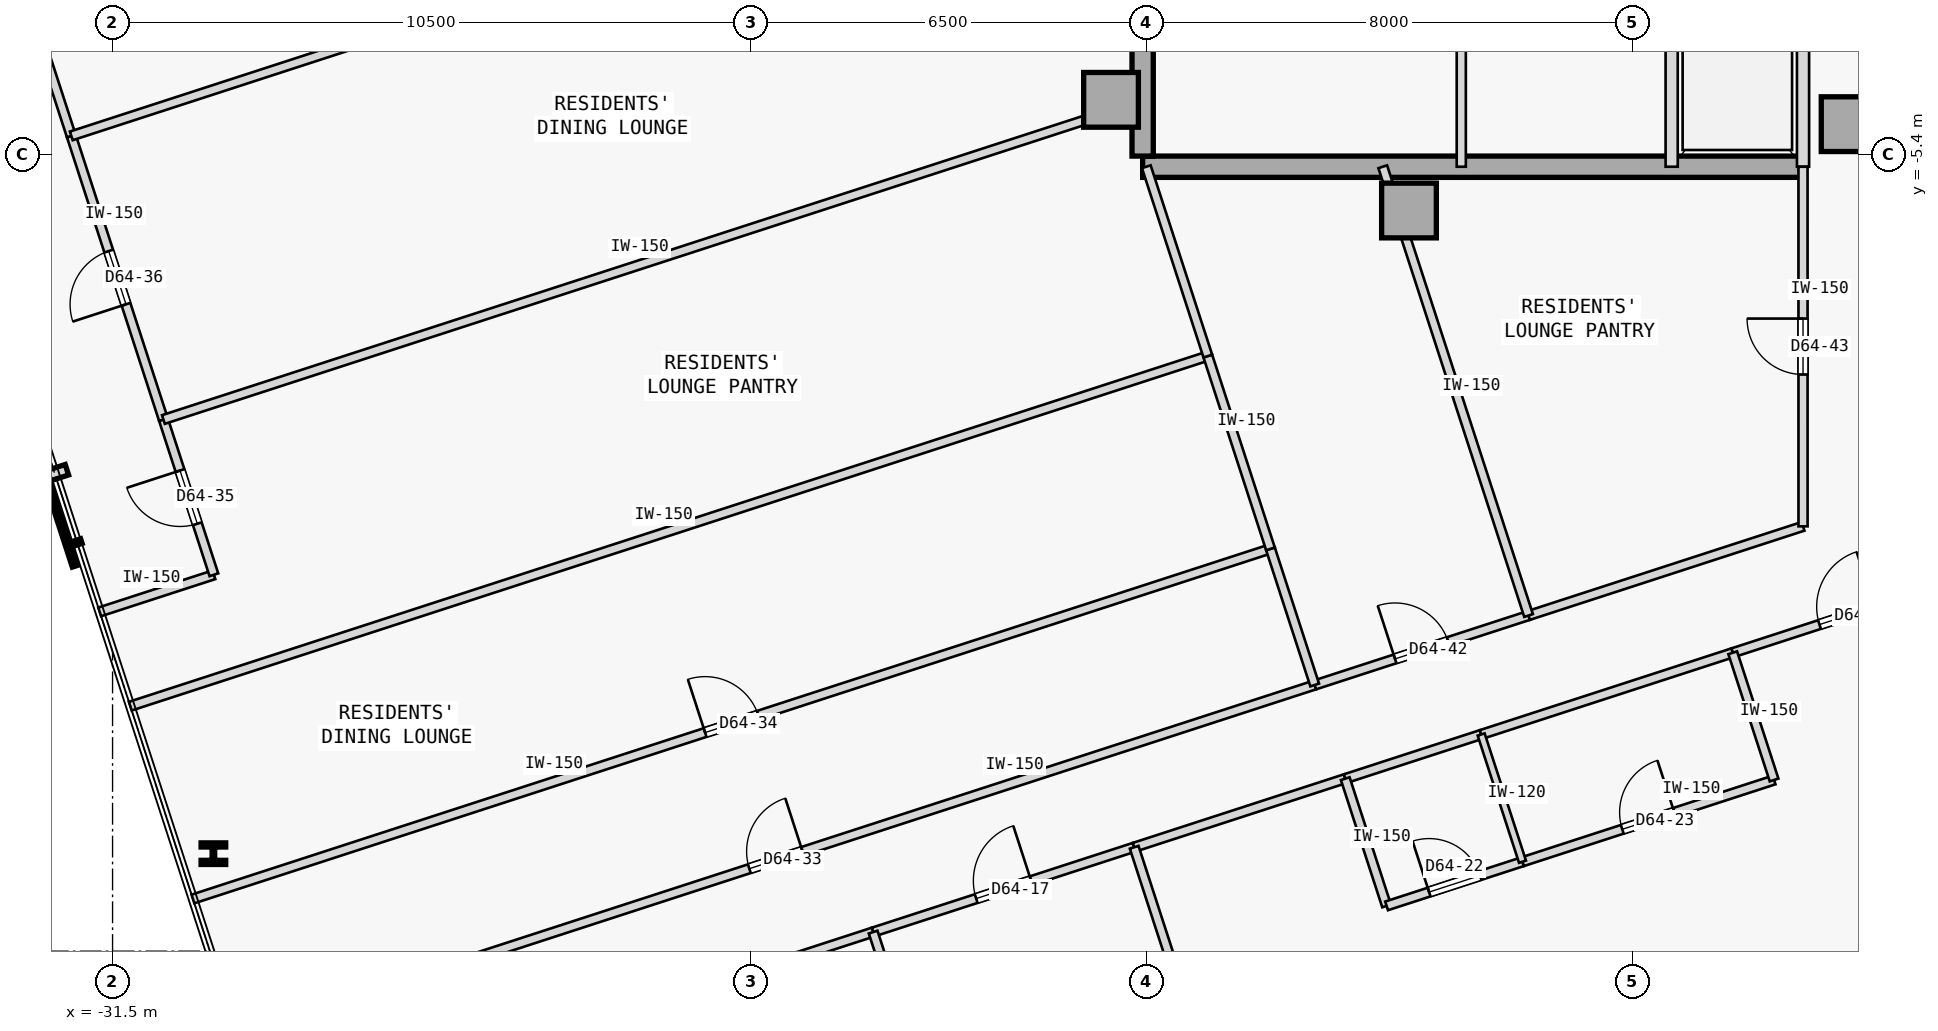
"""IFC4 building model, lengths in metres.
Left out: names, types, materials, properties, quantities, classifications, styles, units other than length and angle.
Written with IfcOpenShell. Run it as: python <this file> out.ifc"""

import sys

from ifc_helpers import new_model, si_unit, direction, frame, frame_2d, origin, origin_2d, place, context, subcontext, project, spatial, rectangle, i_section, extrude, element, fill, save


model = new_model("IFC4")
c1 = context("Model", 3, precision=1e-05, world=origin(), true_north=direction((0.0, 1.0)))
c2 = subcontext(c1, "Body", "Model", "MODEL_VIEW")
j1 = project(units=[si_unit("LENGTHUNIT", "METRE"), si_unit("PLANEANGLEUNIT", "RADIAN")], contexts=[c1])
p1 = place(None, origin())
s1 = spatial("IfcSite", under=j1, at=p1, CompositionType="ELEMENT")
p2 = place(p1, origin())
s2 = spatial("IfcBuilding", under=s1, at=p2, CompositionType="ELEMENT")
p3 = place(p2, frame((0.0, 0.0, 241.05)))
s3 = spatial("IfcBuildingStorey", under=s2, at=p3, CompositionType="ELEMENT", Elevation=241.05)
for number, where, z_axis, x_axis in (
    (1, (-15.08, -4.5, 0.0), (0.0, 0.0, 1.0), (1.0, 0.0, 0.0)),
    (2, (-10.18, -6.32, 0.0), (0.0, 0.0, 1.0), (1.0, 0.0, 0.0)),
    (3, (-2.95, -4.9, 0.0), (0.0, 0.0, 1.0), (1.0, 0.0, 0.0)),
):
    element("IfcColumn", number, at=place(p3, frame(where, z_axis=z_axis, x_axis=x_axis)), inside=s3, PredefinedType="COLUMN", context=c2, shape_type="SweptSolid", body=[
        extrude(rectangle(XDim=0.9, YDim=0.9, at=origin_2d()), origin(), (0.0, 0.0, 1.0), 3.35),
    ])
p4 = place(p3, frame((-14.56, -5.6, 0.0), z_axis=(0.0, 0.0, 1.0), x_axis=(1.0, 0.0, 0.0)))
e4 = element("IfcWall", 4, at=p4, inside=s3, PredefinedType="SHEAR", context=c2, shape_type="SweptSolid", body=[
    extrude(rectangle(XDim=10.86, YDim=0.35, at=frame_2d((5.43, 0.0))), origin(), (0.0, 0.0, 1.0), 3.125),
])
p5 = place(p3, frame((-14.56, -5.425, 0.0), z_axis=(0.0, 0.0, 1.0), x_axis=(0.0, 1.0, 0.0)))
e5 = element("IfcWall", 5, at=p5, inside=s3, PredefinedType="SHEAR", context=c2, shape_type="SweptSolid", body=[
    extrude(rectangle(XDim=10.85, YDim=0.35, at=frame_2d((5.425, 0.0))), origin(), (0.0, 0.0, 1.0), 3.125),
])
p6 = place(p3, frame((-29.842, -16.897, 0.0), z_axis=(0.0, 0.0, 1.0), x_axis=(1.0, 0.0, 0.0)))
e6 = element("IfcColumn", 6, at=p6, inside=s3, PredefinedType="COLUMN", context=c2, shape_type="SweptSolid", body=[
    extrude(i_section(OverallWidth=0.405, OverallDepth=0.355, WebThickness=0.042, FlangeThickness=0.068, FilletRadius=0.015, at=origin_2d()), origin(), (0.0, 0.0, 1.0), 3.35),
])
for number, where, z_axis, x_axis in (
    (7, (-3.7, -5.6, 0.0), (0.0, 0.0, 1.0), (0.0, 1.0, 0.0)),
    (8, (-5.86, -5.6, 0.0), (0.0, 0.0, 1.0), (0.0, 1.0, 0.0)),
):
    element("IfcWall", number, at=place(p3, frame(where, z_axis=z_axis, x_axis=x_axis)), inside=s3, PredefinedType="STANDARD", context=c2, shape_type="SweptSolid", body=[
        extrude(rectangle(XDim=2.65, YDim=0.2, at=frame_2d((1.325, 0.0))), origin(), (0.0, 0.0, 1.0), 3.125),
    ])
p7 = place(p3, frame((-9.32, -5.6, 0.0), z_axis=(0.0, 0.0, 1.0), x_axis=(0.0, 1.0, 0.0)))
e9 = element("IfcWall", 9, at=p7, inside=s3, PredefinedType="PARTITIONING", context=c2, shape_type="SweptSolid", body=[
    extrude(rectangle(XDim=2.65, YDim=0.15, at=frame_2d((1.325, 0.0))), origin(), (0.0, 0.0, 1.0), 3.125),
])
p8 = place(p3, frame((-18.992, -18.186, 0.0), z_axis=(0.0, 0.0, 1.0), x_axis=(0.951067846467, 0.308982121516, 0.0)))
e10 = element("IfcWall", 10, at=p8, inside=s3, PredefinedType="PARTITIONING", context=c2, shape_type="SweptSolid", body=[
    extrude(rectangle(XDim=4.514, YDim=0.15, at=frame_2d((2.257, 0.0))), origin(), (0.0, 0.0, 1.0), 3.125),
])
p9 = place(p8, frame((1.782, 0.0, 0.0)))
e11 = element("IfcOpeningElement", 11, at=p9, cuts=e10, PredefinedType="OPENING", context=c2, shape_type="SweptSolid", body=[
    extrude(rectangle(XDim=0.95, YDim=2.15, at=frame_2d((0.475, 1.075))), frame((0.0, 0.085, 0.0), z_axis=(0.0, -1.0, 0.0), x_axis=(1.0, 0.0, 0.0)), (0.0, 0.0, 1.0), 0.17),
])
p10 = place(p3, frame((-23.129, -19.53, 0.0), z_axis=(0.0, 0.0, 1.0), x_axis=(0.951036130958, 0.309079726951, 0.0)))
e12 = element("IfcWall", 12, at=p10, inside=s3, PredefinedType="PARTITIONING", context=c2, shape_type="SweptSolid", body=[
    extrude(rectangle(XDim=4.35, YDim=0.15, at=frame_2d((2.175, 0.0))), origin(), (0.0, 0.0, 1.0), 3.125),
])
p11 = place(p3, frame((-14.699, -16.791, 0.0), z_axis=(0.0, 0.0, 1.0), x_axis=(0.951050780541, 0.309034646652, 0.0)))
e13 = element("IfcWall", 13, at=p11, inside=s3, PredefinedType="PARTITIONING", context=c2, shape_type="SweptSolid", body=[
    extrude(rectangle(XDim=3.65, YDim=0.15, at=frame_2d((1.825, 0.0))), origin(), (0.0, 0.0, 1.0), 3.125),
])
p12 = place(p3, frame((-4.856, -13.593, 0.0), z_axis=(0.0, 0.0, 1.0), x_axis=(0.951054051148, 0.309024581215, 0.0)))
e14 = element("IfcWall", 14, at=p12, inside=s3, PredefinedType="PARTITIONING", context=c2, shape_type="SweptSolid", body=[
    extrude(rectangle(XDim=3.95, YDim=0.15, at=frame_2d((1.975, 0.0))), origin(), (0.0, 0.0, 1.0), 3.125),
])
p13 = place(p12, frame((1.5, 0.0, 0.0)))
e15 = element("IfcOpeningElement", 15, at=p13, cuts=e14, PredefinedType="OPENING", context=c2, shape_type="SweptSolid", body=[
    extrude(rectangle(XDim=0.95, YDim=2.15, at=frame_2d((0.475, 1.075))), frame((0.0, 0.085, 0.0), z_axis=(0.0, -1.0, 0.0), x_axis=(1.0, 0.0, 0.0)), (0.0, 0.0, 1.0), 0.17),
])
p14 = place(p3, frame((-11.228, -15.663, 0.0), z_axis=(0.0, 0.0, 1.0), x_axis=(0.951076048914, 0.308956872689, 0.0)))
e16 = element("IfcWall", 16, at=p14, inside=s3, PredefinedType="PARTITIONING", context=c2, shape_type="SweptSolid", body=[
    extrude(rectangle(XDim=2.35, YDim=0.15, at=frame_2d((1.175, 0.0))), origin(), (0.0, 0.0, 1.0), 3.125),
])
p15 = place(p3, frame((-8.993, -14.937, 0.0), z_axis=(0.0, 0.0, 1.0), x_axis=(0.951052627573, 0.309028962374, 0.0)))
e17 = element("IfcWall", 17, at=p15, inside=s3, PredefinedType="PARTITIONING", context=c2, shape_type="SweptSolid", body=[
    extrude(rectangle(XDim=4.35, YDim=0.15, at=frame_2d((2.175, 0.0))), origin(), (0.0, 0.0, 1.0), 3.125),
])
p16 = place(p3, frame((-29.45, -19.881, 0.0), z_axis=(0.0, 0.0, 1.0), x_axis=(0.95105650271, 0.309017036186, 0.0)))
e18 = element("IfcWall", 18, at=p16, inside=s3, PredefinedType="PARTITIONING", context=c2, shape_type="SweptSolid", body=[
    extrude(rectangle(XDim=18.632, YDim=0.15, at=frame_2d((9.316, 0.0))), origin(), (0.0, 0.0, 1.0), 3.125),
])
p17 = place(p16, frame((8.856, 0.0, 0.0)))
e19 = element("IfcOpeningElement", 19, at=p17, cuts=e18, PredefinedType="OPENING", context=c2, shape_type="SweptSolid", body=[
    extrude(rectangle(XDim=0.92, YDim=2.15, at=frame_2d((0.46, 1.075))), frame((0.0, 0.085, 0.0), z_axis=(0.0, -1.0, 0.0), x_axis=(1.0, 0.0, 0.0)), (0.0, 0.0, 1.0), 0.17),
])
p18 = place(p3, frame((-31.712, -12.921, 0.0), z_axis=(0.0, 0.0, 1.0), x_axis=(0.951054051148, 0.309024581215, 0.0)))
e20 = element("IfcWall", 20, at=p18, inside=s3, PredefinedType="PARTITIONING", context=c2, shape_type="SweptSolid", body=[
    extrude(rectangle(XDim=1.975, YDim=0.15, at=frame_2d((0.988, 0.0))), origin(), (0.0, 0.0, 1.0), 3.125),
])
p19 = place(p3, frame((-29.833, -12.311, 0.0), z_axis=(0.0, 0.0, 1.0), x_axis=(-0.309044953986, 0.951047431213, 0.0)))
e21 = element("IfcWall", 21, at=p19, inside=s3, PredefinedType="PARTITIONING", context=c2, shape_type="SweptSolid", body=[
    extrude(rectangle(XDim=2.685, YDim=0.15, at=frame_2d((1.343, 0.0))), origin(), (0.0, 0.0, 1.0), 3.125),
])
p20 = place(p19, frame((0.883, 0.0, 0.0)))
e22 = element("IfcOpeningElement", 22, at=p20, cuts=e21, PredefinedType="OPENING", context=c2, shape_type="SweptSolid", body=[
    extrude(rectangle(XDim=0.92, YDim=2.15, at=frame_2d((0.46, 1.075))), frame((0.0, 0.085, 0.0), z_axis=(0.0, -1.0, 0.0), x_axis=(1.0, 0.0, 0.0)), (0.0, 0.0, 1.0), 0.17),
])
p21 = place(p3, frame((-30.663, -9.757, 0.0), z_axis=(0.0, 0.0, 1.0), x_axis=(-0.309019653166, 0.951055652397, 0.0)))
e23 = element("IfcWall", 23, at=p21, inside=s3, PredefinedType="PARTITIONING", context=c2, shape_type="SweptSolid", body=[
    extrude(rectangle(XDim=4.904, YDim=0.15, at=frame_2d((2.452, 0.0))), origin(), (0.0, 0.0, 1.0), 3.125),
])
p22 = place(p21, frame((1.992, 0.0, 0.0)))
e24 = element("IfcOpeningElement", 24, at=p22, cuts=e23, PredefinedType="OPENING", context=c2, shape_type="SweptSolid", body=[
    extrude(rectangle(XDim=0.92, YDim=2.15, at=frame_2d((0.46, 1.075))), frame((0.0, 0.085, 0.0), z_axis=(0.0, -1.0, 0.0), x_axis=(1.0, 0.0, 0.0)), (0.0, 0.0, 1.0), 0.17),
])
p23 = place(p3, frame((-32.179, -5.093, 0.0), z_axis=(0.0, 0.0, 1.0), x_axis=(-0.309014532869, 0.951057316083, 0.0)))
e25 = element("IfcWall", 25, at=p23, inside=s3, PredefinedType="PARTITIONING", context=c2, shape_type="SweptSolid", body=[
    extrude(rectangle(XDim=4.707, YDim=0.15, at=frame_2d((2.354, 0.0))), origin(), (0.0, 0.0, 1.0), 3.125),
])
p24 = place(p3, frame((-11.73, -14.123, 0.0), z_axis=(0.0, 0.0, 1.0), x_axis=(0.951052502763, 0.309029346483, 0.0)))
e26 = element("IfcWall", 26, at=p24, inside=s3, PredefinedType="PARTITIONING", context=c2, shape_type="SweptSolid", body=[
    extrude(rectangle(XDim=3.698, YDim=0.15, at=frame_2d((1.849, 0.0))), origin(), (0.0, 0.0, 1.0), 3.125),
])
p25 = place(p24, frame((1.389, 0.0, 0.0)))
e27 = element("IfcOpeningElement", 27, at=p25, cuts=e26, PredefinedType="OPENING", context=c2, shape_type="SweptSolid", body=[
    extrude(rectangle(XDim=0.92, YDim=2.15, at=frame_2d((0.46, 1.075))), frame((0.0, 0.085, 0.0), z_axis=(0.0, -1.0, 0.0), x_axis=(1.0, 0.0, 0.0)), (0.0, 0.0, 1.0), 0.17),
])
p26 = place(p3, frame((-8.213, -12.98, 0.0), z_axis=(0.0, 0.0, 1.0), x_axis=(0.951058260096, 0.309011627456, 0.0)))
e28 = element("IfcWall", 28, at=p26, inside=s3, PredefinedType="PARTITIONING", context=c2, shape_type="SweptSolid", body=[
    extrude(rectangle(XDim=4.746, YDim=0.15, at=frame_2d((2.373, 0.0))), origin(), (0.0, 0.0, 1.0), 3.125),
])
p27 = place(p3, frame((-3.7, -11.514, 0.0), z_axis=(0.0, 0.0, 1.0), x_axis=(-8.2572974e-05, 0.999999996591, 0.0)))
e29 = element("IfcWall", 29, at=p27, inside=s3, PredefinedType="PARTITIONING", context=c2, shape_type="SweptSolid", body=[
    extrude(rectangle(XDim=5.913, YDim=0.15, at=frame_2d((2.957, 0.0))), origin(), (0.0, 0.0, 1.0), 3.125),
])
p28 = place(p27, frame((2.497, 0.0, 0.0)))
e30 = element("IfcOpeningElement", 30, at=p28, cuts=e29, PredefinedType="OPENING", context=c2, shape_type="SweptSolid", body=[
    extrude(rectangle(XDim=0.92, YDim=2.15, at=frame_2d((0.46, 1.075))), frame((0.0, 0.085, 0.0), z_axis=(0.0, -1.0, 0.0), x_axis=(1.0, 0.0, 0.0)), (0.0, 0.0, 1.0), 0.17),
])
p29 = place(p3, frame((-18.312, -20.278, 0.0), z_axis=(0.0, 0.0, 1.0), x_axis=(-0.309028364152, 0.951052821956, 0.0)))
e31 = element("IfcWall", 31, at=p29, inside=s3, PredefinedType="PARTITIONING", context=c2, shape_type="SweptSolid", body=[
    extrude(rectangle(XDim=2.2, YDim=0.15, at=frame_2d((1.1, 0.0))), origin(), (0.0, 0.0, 1.0), 3.125),
])
p30 = place(p3, frame((-11.652, -26.17, 0.0), z_axis=(0.0, 0.0, 1.0), x_axis=(-0.308999867152, 0.951062081097, 0.0)))
e32 = element("IfcWall", 32, at=p30, inside=s3, PredefinedType="PARTITIONING", context=c2, shape_type="SweptSolid", body=[
    extrude(rectangle(XDim=9.862, YDim=0.15, at=frame_2d((4.931, 0.0))), origin(), (0.0, 0.0, 1.0), 3.125),
])
p31 = place(p3, frame((-10.548, -17.755, 0.0), z_axis=(0.0, 0.0, 1.0), x_axis=(-0.309060979314, 0.951042223598, 0.0)))
e33 = element("IfcWall", 33, at=p31, inside=s3, PredefinedType="PARTITIONING", context=c2, shape_type="SweptSolid", body=[
    extrude(rectangle(XDim=2.2, YDim=0.15, at=frame_2d((1.1, 0.0))), origin(), (0.0, 0.0, 1.0), 3.125),
])
p32 = place(p3, frame((-10.548, -17.755, 0.0), z_axis=(0.0, 0.0, 1.0), x_axis=(0.951076048914, 0.308956872689, 0.0)))
e34 = element("IfcWall", 34, at=p32, inside=s3, PredefinedType="PARTITIONING", context=c2, shape_type="SweptSolid", body=[
    extrude(rectangle(XDim=2.35, YDim=0.15, at=frame_2d((1.175, 0.0))), origin(), (0.0, 0.0, 1.0), 3.125),
])
p33 = place(p32, frame((0.735, 0.0, 0.0)))
e35 = element("IfcOpeningElement", 35, at=p33, cuts=e34, PredefinedType="OPENING", context=c2, shape_type="SweptSolid", body=[
    extrude(rectangle(XDim=0.88, YDim=2.15, at=frame_2d((0.44, 1.075))), frame((0.0, 0.085, 0.0), z_axis=(0.0, -1.0, 0.0), x_axis=(1.0, 0.0, 0.0)), (0.0, 0.0, 1.0), 0.17),
])
p34 = place(p3, frame((-8.313, -17.029, 0.0), z_axis=(0.0, 0.0, 1.0), x_axis=(0.951052627573, 0.309028962374, 0.0)))
e36 = element("IfcWall", 36, at=p34, inside=s3, PredefinedType="PARTITIONING", context=c2, shape_type="SweptSolid", body=[
    extrude(rectangle(XDim=4.35, YDim=0.15, at=frame_2d((2.175, 0.0))), origin(), (0.0, 0.0, 1.0), 3.125),
])
p35 = place(p34, frame((1.725, 0.0, 0.0)))
e37 = element("IfcOpeningElement", 37, at=p35, cuts=e36, PredefinedType="OPENING", context=c2, shape_type="SweptSolid", body=[
    extrude(rectangle(XDim=0.9, YDim=2.15, at=frame_2d((0.45, 1.075))), frame((0.0, 0.085, 0.0), z_axis=(0.0, -1.0, 0.0), x_axis=(1.0, 0.0, 0.0)), (0.0, 0.0, 1.0), 0.17),
])
p36 = place(p3, frame((-4.176, -15.685, 0.0), z_axis=(0.0, 0.0, 1.0), x_axis=(-0.309060979314, 0.951042223598, 0.0)))
e38 = element("IfcWall", 38, at=p36, inside=s3, PredefinedType="PARTITIONING", context=c2, shape_type="SweptSolid", body=[
    extrude(rectangle(XDim=2.2, YDim=0.15, at=frame_2d((1.1, 0.0))), origin(), (0.0, 0.0, 1.0), 3.125),
])
p37 = place(p3, frame((-8.313, -17.029, 0.0), z_axis=(0.0, 0.0, 1.0), x_axis=(-0.309060979314, 0.951042223598, 0.0)))
e39 = element("IfcWall", 39, at=p37, inside=s3, PredefinedType="PARTITIONING", context=c2, shape_type="SweptSolid", body=[
    extrude(rectangle(XDim=2.2, YDim=0.12, at=frame_2d((1.1, 0.0))), origin(), (0.0, 0.0, 1.0), 3.125),
])
p38 = place(p3, frame((-30.178, -17.642, 0.0), z_axis=(0.0, 0.0, 1.0), x_axis=(0.95105650271, 0.309017036186, 0.0)))
e40 = element("IfcWall", 40, at=p38, inside=s3, PredefinedType="PARTITIONING", context=c2, shape_type="SweptSolid", body=[
    extrude(rectangle(XDim=18.632, YDim=0.15, at=frame_2d((9.316, 0.0))), origin(), (0.0, 0.0, 1.0), 3.125),
])
p39 = place(p38, frame((8.856, 0.0, 0.0)))
e41 = element("IfcOpeningElement", 41, at=p39, cuts=e40, PredefinedType="OPENING", context=c2, shape_type="SweptSolid", body=[
    extrude(rectangle(XDim=0.92, YDim=2.15, at=frame_2d((0.46, 1.075))), frame((0.0, 0.085, 0.0), z_axis=(0.0, -1.0, 0.0), x_axis=(1.0, 0.0, 0.0)), (0.0, 0.0, 1.0), 0.17),
])
p40 = place(p3, frame((-11.73, -14.123, 0.0), z_axis=(0.0, 0.0, 1.0), x_axis=(-0.309062621189, 0.951041690035, 0.0)))
e42 = element("IfcWall", 42, at=p40, inside=s3, PredefinedType="PARTITIONING", context=c2, shape_type="SweptSolid", body=[
    extrude(rectangle(XDim=2.354, YDim=0.15, at=frame_2d((1.177, 0.0))), origin(), (0.0, 0.0, 1.0), 3.125),
])
p41 = place(p3, frame((-31.208, -14.471, 0.0), z_axis=(0.0, 0.0, 1.0), x_axis=(0.951057753948, 0.309013185244, 0.0)))
e43 = element("IfcWall", 43, at=p41, inside=s3, PredefinedType="PARTITIONING", context=c2, shape_type="SweptSolid", body=[
    extrude(rectangle(XDim=18.632, YDim=0.15, at=frame_2d((9.316, 0.0))), origin(), (0.0, 0.0, 1.0), 3.125),
])
p42 = place(p3, frame((-12.458, -11.884, 0.0), z_axis=(0.0, 0.0, 1.0), x_axis=(-0.308946982245, 0.951079261766, 0.0)))
e44 = element("IfcWall", 44, at=p42, inside=s3, PredefinedType="PARTITIONING", context=c2, shape_type="SweptSolid", body=[
    extrude(rectangle(XDim=3.334, YDim=0.15, at=frame_2d((1.667, 0.0))), origin(), (0.0, 0.0, 1.0), 3.125),
])
p43 = place(p3, frame((-30.663, -9.757, 0.0), z_axis=(0.0, 0.0, 1.0), x_axis=(0.951058192995, 0.309011833974, 0.0)))
e45 = element("IfcWall", 45, at=p43, inside=s3, PredefinedType="PARTITIONING", context=c2, shape_type="SweptSolid", body=[
    extrude(rectangle(XDim=16.657, YDim=0.15, at=frame_2d((8.329, 0.0))), origin(), (0.0, 0.0, 1.0), 3.125),
])
p44 = place(p3, frame((-13.488, -8.713, 0.0), z_axis=(0.0, 0.0, 1.0), x_axis=(-0.309082700143, 0.951035164687, 0.0)))
e46 = element("IfcWall", 46, at=p44, inside=s3, PredefinedType="PARTITIONING", context=c2, shape_type="SweptSolid", body=[
    extrude(rectangle(XDim=3.274, YDim=0.15, at=frame_2d((1.637, 0.0))), origin(), (0.0, 0.0, 1.0), 3.125),
])
p45 = place(p3, frame((-32.179, -5.093, 0.0), z_axis=(0.0, 0.0, 1.0), x_axis=(0.951053885426, 0.309025091239, 0.0)))
e47 = element("IfcWall", 47, at=p45, inside=s3, PredefinedType="PARTITIONING", context=c2, shape_type="SweptSolid", body=[
    extrude(rectangle(XDim=16.657, YDim=0.15, at=frame_2d((8.329, 0.0))), origin(), (0.0, 0.0, 1.0), 3.125),
])
p46 = place(p3, frame((-8.213, -12.98, 0.0), z_axis=(0.0, 0.0, 1.0), x_axis=(-0.309017065592, 0.951056493155, 0.0)))
e48 = element("IfcWall", 48, at=p46, inside=s3, PredefinedType="PARTITIONING", context=c2, shape_type="SweptSolid", body=[
    extrude(rectangle(XDim=7.76, YDim=0.15, at=frame_2d((3.88, 0.0))), origin(), (0.0, 0.0, 1.0), 3.125),
])
p47 = place(p9, origin())
e49 = element("IfcDoor", 49, at=p47, inside=s3, OperationType="SINGLE_SWING_RIGHT", PredefinedType="DOOR", context=c2, shape_type="SweptSolid", body=[
    extrude(rectangle(XDim=0.95, YDim=2.15, at=frame_2d((0.475, 1.075))), frame((0.0, 0.025, 0.0), z_axis=(0.0, -1.0, 0.0), x_axis=(1.0, 0.0, 0.0)), (0.0, 0.0, 1.0), 0.05),
])
fill(e11, e49)
p48 = place(p13, origin())
e50 = element("IfcDoor", 50, at=p48, inside=s3, OperationType="SINGLE_SWING_RIGHT", PredefinedType="DOOR", context=c2, shape_type="SweptSolid", body=[
    extrude(rectangle(XDim=0.95, YDim=2.15, at=frame_2d((0.475, 1.075))), frame((0.0, 0.025, 0.0), z_axis=(0.0, -1.0, 0.0), x_axis=(1.0, 0.0, 0.0)), (0.0, 0.0, 1.0), 0.05),
])
fill(e15, e50)
p49 = place(p33, origin())
e51 = element("IfcDoor", 51, at=p49, inside=s3, OperationType="SINGLE_SWING_LEFT", PredefinedType="DOOR", context=c2, shape_type="SweptSolid", body=[
    extrude(rectangle(XDim=0.88, YDim=2.15, at=frame_2d((0.44, 1.075))), frame((0.0, 0.025, 0.0), z_axis=(0.0, -1.0, 0.0), x_axis=(1.0, 0.0, 0.0)), (0.0, 0.0, 1.0), 0.05),
])
fill(e35, e51)
p50 = place(p35, origin())
e52 = element("IfcDoor", 52, at=p50, inside=s3, OperationType="SINGLE_SWING_RIGHT", PredefinedType="DOOR", context=c2, shape_type="SweptSolid", body=[
    extrude(rectangle(XDim=0.9, YDim=2.15, at=frame_2d((0.45, 1.075))), frame((0.0, 0.025, 0.0), z_axis=(0.0, -1.0, 0.0), x_axis=(1.0, 0.0, 0.0)), (0.0, 0.0, 1.0), 0.05),
])
fill(e37, e52)
p51 = place(p17, origin())
e53 = element("IfcDoor", 53, at=p51, inside=s3, OperationType="SINGLE_SWING_RIGHT", PredefinedType="DOOR", context=c2, shape_type="SweptSolid", body=[
    extrude(rectangle(XDim=0.92, YDim=2.15, at=frame_2d((0.46, 1.075))), frame((0.0, 0.025, 0.0), z_axis=(0.0, -1.0, 0.0), x_axis=(1.0, 0.0, 0.0)), (0.0, 0.0, 1.0), 0.05),
])
fill(e19, e53)
p52 = place(p39, origin())
e54 = element("IfcDoor", 54, at=p52, inside=s3, OperationType="SINGLE_SWING_LEFT", PredefinedType="DOOR", context=c2, shape_type="SweptSolid", body=[
    extrude(rectangle(XDim=0.92, YDim=2.15, at=frame_2d((0.46, 1.075))), frame((0.0, 0.025, 0.0), z_axis=(0.0, -1.0, 0.0), x_axis=(1.0, 0.0, 0.0)), (0.0, 0.0, 1.0), 0.05),
])
fill(e41, e54)
p53 = place(p20, origin())
e55 = element("IfcDoor", 55, at=p53, inside=s3, OperationType="SINGLE_SWING_RIGHT", PredefinedType="DOOR", context=c2, shape_type="SweptSolid", body=[
    extrude(rectangle(XDim=0.92, YDim=2.15, at=frame_2d((0.46, 1.075))), frame((0.0, 0.025, 0.0), z_axis=(0.0, -1.0, 0.0), x_axis=(1.0, 0.0, 0.0)), (0.0, 0.0, 1.0), 0.05),
])
fill(e22, e55)
p54 = place(p22, origin())
e56 = element("IfcDoor", 56, at=p54, inside=s3, OperationType="SINGLE_SWING_LEFT", PredefinedType="DOOR", context=c2, shape_type="SweptSolid", body=[
    extrude(rectangle(XDim=0.92, YDim=2.15, at=frame_2d((0.46, 1.075))), frame((0.0, 0.025, 0.0), z_axis=(0.0, -1.0, 0.0), x_axis=(1.0, 0.0, 0.0)), (0.0, 0.0, 1.0), 0.05),
])
fill(e24, e56)
p55 = place(p25, origin())
e57 = element("IfcDoor", 57, at=p55, inside=s3, OperationType="SINGLE_SWING_LEFT", PredefinedType="DOOR", context=c2, shape_type="SweptSolid", body=[
    extrude(rectangle(XDim=0.92, YDim=2.15, at=frame_2d((0.46, 1.075))), frame((0.0, 0.025, 0.0), z_axis=(0.0, -1.0, 0.0), x_axis=(1.0, 0.0, 0.0)), (0.0, 0.0, 1.0), 0.05),
])
fill(e27, e57)
p56 = place(p28, origin())
e58 = element("IfcDoor", 58, at=p56, inside=s3, OperationType="SINGLE_SWING_RIGHT", PredefinedType="DOOR", context=c2, shape_type="SweptSolid", body=[
    extrude(rectangle(XDim=0.92, YDim=2.15, at=frame_2d((0.46, 1.075))), frame((0.0, 0.025, 0.0), z_axis=(0.0, -1.0, 0.0), x_axis=(1.0, 0.0, 0.0)), (0.0, 0.0, 1.0), 0.05),
])
fill(e30, e58)
save(model, sys.argv[1])
